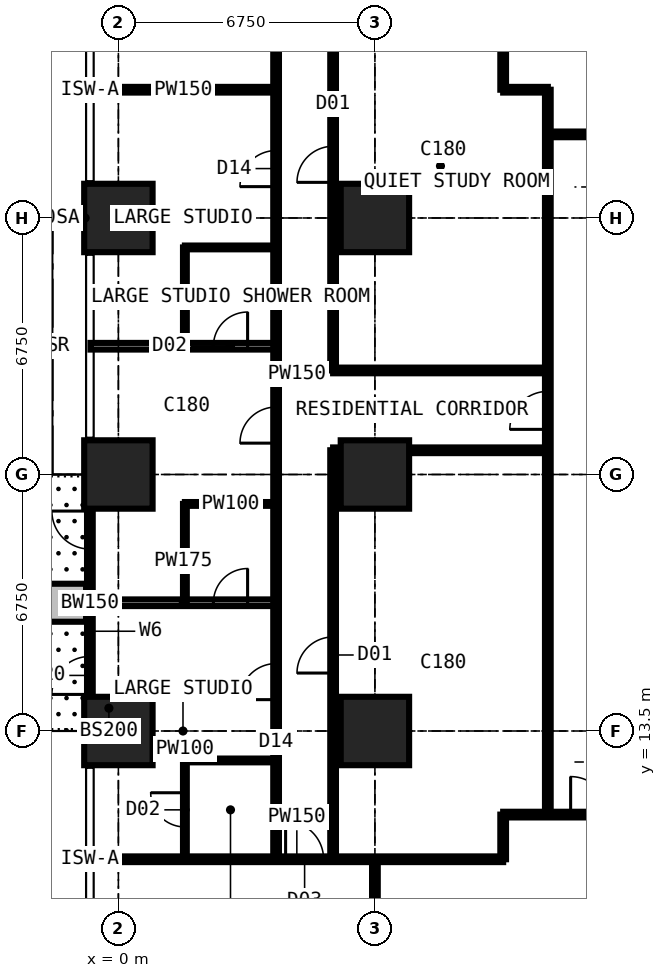
"""IFC4 building model, lengths in metres.
Left out: names, types, materials, properties, quantities, classifications, styles, units other than length and angle.
Written with IfcOpenShell. Run it as: python <this file> out.ifc"""

import sys

from ifc_helpers import new_model, si_unit, direction, frame, frame_2d, origin, origin_2d, place, context, subcontext, project, spatial, rectangle, extrude, element, fill, save


model = new_model("IFC4")
c1 = context("Model", 3, precision=1e-05, world=origin(), true_north=direction((0.0, 1.0)))
c2 = subcontext(c1, "Body", "Model", "MODEL_VIEW")
j1 = project(units=[si_unit("LENGTHUNIT", "METRE"), si_unit("PLANEANGLEUNIT", "RADIAN")], contexts=[c1])
p1 = place(None, origin())
s1 = spatial("IfcSite", under=j1, at=p1, CompositionType="ELEMENT")
p2 = place(p1, origin())
s2 = spatial("IfcBuilding", under=s1, at=p2, CompositionType="ELEMENT")
p3 = place(p2, frame((0.0, 0.0, 54.0)))
s3 = spatial("IfcBuildingStorey", under=s2, at=p3, CompositionType="ELEMENT", Elevation=54.0)
for number, where, z_axis, x_axis in (
    (1, (0.0, 13.5, 0.0), (0.0, 0.0, 1.0), (1.0, 0.0, 0.0)),
    (2, (0.0, 20.25, 0.0), (0.0, 0.0, 1.0), (1.0, 0.0, 0.0)),
    (3, (0.0, 27.0, 0.0), (0.0, 0.0, 1.0), (1.0, 0.0, 0.0)),
    (4, (6.75, 13.5, 0.0), (0.0, 0.0, 1.0), (1.0, 0.0, 0.0)),
    (5, (6.75, 20.25, 0.0), (0.0, 0.0, 1.0), (1.0, 0.0, 0.0)),
    (6, (6.75, 27.0, 0.0), (0.0, 0.0, 1.0), (1.0, 0.0, 0.0)),
):
    element("IfcColumn", number, at=place(p3, frame(where, z_axis=z_axis, x_axis=x_axis)), inside=s3, PredefinedType="COLUMN", context=c2, shape_type="SweptSolid", body=[
        extrude(rectangle(XDim=1.8, YDim=1.8, at=origin_2d()), origin(), (0.0, 0.0, 1.0), 3.6),
    ])
p4 = place(p3, frame((-0.75, 13.5, 0.0), z_axis=(0.0, 0.0, 1.0), x_axis=(0.0, 1.0, 0.0)))
e7 = element("IfcWall", 7, at=p4, inside=s3, PredefinedType="SOLIDWALL", context=c2, shape_type="SweptSolid", body=[
    extrude(rectangle(XDim=6.75, YDim=0.15, at=frame_2d((3.375, 0.0))), origin(), (0.0, 0.0, 1.0), 3.375),
])
p5 = place(p4, frame((0.962, 0.0, 0.0)))
e8 = element("IfcOpeningElement", 8, at=p5, cuts=e7, PredefinedType="OPENING", context=c2, shape_type="SweptSolid", body=[
    extrude(rectangle(XDim=1.0, YDim=2.2, at=frame_2d((0.5, 1.1))), frame((0.0, 0.085, 0.0), z_axis=(0.0, -1.0, 0.0), x_axis=(1.0, 0.0, 0.0)), (0.0, 0.0, 1.0), 0.17),
])
p6 = place(p4, frame((2.025, 0.0, 0.9)))
e9 = element("IfcOpeningElement", 9, at=p6, cuts=e7, PredefinedType="OPENING", context=c2, shape_type="SweptSolid", body=[
    extrude(rectangle(XDim=1.2, YDim=1.8, at=frame_2d((0.6, 0.9))), frame((0.0, 0.085, 0.0), z_axis=(0.0, -1.0, 0.0), x_axis=(1.0, 0.0, 0.0)), (0.0, 0.0, 1.0), 0.17),
])
p7 = place(p4, frame((4.788, 0.0, 0.0)))
e10 = element("IfcOpeningElement", 10, at=p7, cuts=e7, PredefinedType="OPENING", context=c2, shape_type="SweptSolid", body=[
    extrude(rectangle(XDim=1.0, YDim=2.2, at=frame_2d((0.5, 1.1))), frame((0.0, 0.085, 0.0), z_axis=(0.0, -1.0, 0.0), x_axis=(1.0, 0.0, 0.0)), (0.0, 0.0, 1.0), 0.17),
])
p8 = place(p4, frame((3.525, 0.0, 0.9)))
e11 = element("IfcOpeningElement", 11, at=p8, cuts=e7, PredefinedType="OPENING", context=c2, shape_type="SweptSolid", body=[
    extrude(rectangle(XDim=1.2, YDim=1.8, at=frame_2d((0.6, 0.9))), frame((0.0, 0.085, 0.0), z_axis=(0.0, -1.0, 0.0), x_axis=(1.0, 0.0, 0.0)), (0.0, 0.0, 1.0), 0.17),
])
p9 = place(p3, frame((-0.85, 16.875, 0.0), z_axis=(0.0, 0.0, 1.0), x_axis=(-1.0, 0.0, 0.0)))
e12 = element("IfcWall", 12, at=p9, inside=s3, PredefinedType="USERDEFINED", context=c2, shape_type="SweptSolid", body=[
    extrude(rectangle(XDim=2.2, YDim=1.0, at=frame_2d((1.1, 0.0))), origin(), (0.0, 0.0, 1.0), 0.9),
])
p10 = place(p3, frame((-0.734, 10.125, 0.0), z_axis=(0.0, 0.0, 1.0), x_axis=(1.0, 0.0, 0.0)))
e13 = element("IfcWall", 13, at=p10, inside=s3, PredefinedType="PARTITIONING", context=c2, shape_type="SweptSolid", body=[
    extrude(rectangle(XDim=10.859, YDim=0.15, at=frame_2d((5.429, 0.0))), origin(), (0.0, 0.0, 1.0), 3.375),
])
p11 = place(p10, frame((5.134, 0.0, 0.0)))
e14 = element("IfcOpeningElement", 14, at=p11, cuts=e13, PredefinedType="OPENING", context=c2, shape_type="SweptSolid", body=[
    extrude(rectangle(XDim=1.0, YDim=2.2, at=frame_2d((0.5, 1.1))), frame((0.0, 0.085, 0.0), z_axis=(0.0, -1.0, 0.0), x_axis=(1.0, 0.0, 0.0)), (0.0, 0.0, 1.0), 0.17),
])
p12 = place(p3, frame((-0.734, 16.875, 0.0), z_axis=(0.0, 0.0, 1.0), x_axis=(1.0, 0.0, 0.0)))
e15 = element("IfcWall", 15, at=p12, inside=s3, PredefinedType="PARTITIONING", context=c2, shape_type="SweptSolid", body=[
    extrude(rectangle(XDim=4.884, YDim=0.175, at=frame_2d((2.442, 0.0))), origin(), (0.0, 0.0, 1.0), 3.375),
])
p13 = place(p12, frame((3.234, 0.0, 0.0)))
e16 = element("IfcOpeningElement", 16, at=p13, cuts=e15, PredefinedType="OPENING", context=c2, shape_type="SweptSolid", body=[
    extrude(rectangle(XDim=0.9, YDim=2.2, at=frame_2d((0.45, 1.1))), frame((0.0, 0.097, 0.0), z_axis=(0.0, -1.0, 0.0), x_axis=(1.0, 0.0, 0.0)), (0.0, 0.0, 1.0), 0.195),
])
p14 = place(p3, frame((-0.734, 23.625, 0.0), z_axis=(0.0, 0.0, 1.0), x_axis=(1.0, 0.0, 0.0)))
e17 = element("IfcWall", 17, at=p14, inside=s3, PredefinedType="PARTITIONING", context=c2, shape_type="SweptSolid", body=[
    extrude(rectangle(XDim=4.884, YDim=0.175, at=frame_2d((2.442, 0.0))), origin(), (0.0, 0.0, 1.0), 3.375),
])
p15 = place(p14, frame((3.234, 0.0, 0.0)))
e18 = element("IfcOpeningElement", 18, at=p15, cuts=e17, PredefinedType="OPENING", context=c2, shape_type="SweptSolid", body=[
    extrude(rectangle(XDim=0.9, YDim=2.2, at=frame_2d((0.45, 1.1))), frame((0.0, 0.097, 0.0), z_axis=(0.0, -1.0, 0.0), x_axis=(1.0, 0.0, 0.0)), (0.0, 0.0, 1.0), 0.195),
])
p16 = place(p3, frame((-0.734, 30.375, 0.0), z_axis=(0.0, 0.0, 1.0), x_axis=(1.0, 0.0, 0.0)))
e19 = element("IfcWall", 19, at=p16, inside=s3, PredefinedType="PARTITIONING", context=c2, shape_type="SweptSolid", body=[
    extrude(rectangle(XDim=4.884, YDim=0.15, at=frame_2d((2.442, 0.0))), origin(), (0.0, 0.0, 1.0), 3.375),
])
p17 = place(p3, frame((1.75, 10.125, 0.0), z_axis=(0.0, 0.0, 1.0), x_axis=(0.0, 1.0, 0.0)))
e20 = element("IfcWall", 20, at=p17, inside=s3, PredefinedType="PARTITIONING", context=c2, shape_type="SweptSolid", body=[
    extrude(rectangle(XDim=2.6, YDim=0.1, at=frame_2d((1.3, 0.0))), origin(), (0.0, 0.0, 1.0), 3.375),
])
p18 = place(p17, frame((0.85, 0.0, 0.0)))
e21 = element("IfcOpeningElement", 21, at=p18, cuts=e20, PredefinedType="OPENING", context=c2, shape_type="SweptSolid", body=[
    extrude(rectangle(XDim=0.9, YDim=2.2, at=frame_2d((0.45, 1.1))), frame((0.0, 0.06, 0.0), z_axis=(0.0, -1.0, 0.0), x_axis=(1.0, 0.0, 0.0)), (0.0, 0.0, 1.0), 0.12),
])
p19 = place(p3, frame((1.75, 12.725, 0.0), z_axis=(0.0, 0.0, 1.0), x_axis=(1.0, 0.0, 0.0)))
e22 = element("IfcWall", 22, at=p19, inside=s3, PredefinedType="PARTITIONING", context=c2, shape_type="SweptSolid", body=[
    extrude(rectangle(XDim=2.4, YDim=0.1, at=frame_2d((1.2, 0.0))), origin(), (0.0, 0.0, 1.0), 3.375),
])
p20 = place(p3, frame((1.75, 16.875, 0.0), z_axis=(0.0, 0.0, 1.0), x_axis=(0.0, 1.0, 0.0)))
e23 = element("IfcWall", 23, at=p20, inside=s3, PredefinedType="PARTITIONING", context=c2, shape_type="SweptSolid", body=[
    extrude(rectangle(XDim=2.6, YDim=0.1, at=frame_2d((1.3, 0.0))), origin(), (0.0, 0.0, 1.0), 3.375),
])
p21 = place(p3, frame((1.75, 19.475, 0.0), z_axis=(0.0, 0.0, 1.0), x_axis=(1.0, 0.0, 0.0)))
e24 = element("IfcWall", 24, at=p21, inside=s3, PredefinedType="PARTITIONING", context=c2, shape_type="SweptSolid", body=[
    extrude(rectangle(XDim=2.4, YDim=0.1, at=frame_2d((1.2, 0.0))), origin(), (0.0, 0.0, 1.0), 3.375),
])
p22 = place(p3, frame((1.75, 23.625, 0.0), z_axis=(0.0, 0.0, 1.0), x_axis=(0.0, 1.0, 0.0)))
e25 = element("IfcWall", 25, at=p22, inside=s3, PredefinedType="PARTITIONING", context=c2, shape_type="SweptSolid", body=[
    extrude(rectangle(XDim=2.6, YDim=0.1, at=frame_2d((1.3, 0.0))), origin(), (0.0, 0.0, 1.0), 3.375),
])
p23 = place(p3, frame((1.75, 26.225, 0.0), z_axis=(0.0, 0.0, 1.0), x_axis=(1.0, 0.0, 0.0)))
e26 = element("IfcWall", 26, at=p23, inside=s3, PredefinedType="PARTITIONING", context=c2, shape_type="SweptSolid", body=[
    extrude(rectangle(XDim=2.4, YDim=0.1, at=frame_2d((1.2, 0.0))), origin(), (0.0, 0.0, 1.0), 3.375),
])
p24 = place(p3, frame((4.15, 10.125, 0.0), z_axis=(0.0, 0.0, 1.0), x_axis=(0.0, 1.0, 0.0)))
e27 = element("IfcWall", 27, at=p24, inside=s3, PredefinedType="PARTITIONING", context=c2, shape_type="SweptSolid", body=[
    extrude(rectangle(XDim=23.625, YDim=0.15, at=frame_2d((11.812, 0.0))), origin(), (0.0, 0.0, 1.0), 3.375),
])
p25 = place(p24, frame((4.2, 0.0, 0.0)))
e28 = element("IfcOpeningElement", 28, at=p25, cuts=e27, PredefinedType="OPENING", context=c2, shape_type="SweptSolid", body=[
    extrude(rectangle(XDim=0.95, YDim=2.2, at=frame_2d((0.475, 1.1))), frame((0.0, 0.085, 0.0), z_axis=(0.0, -1.0, 0.0), x_axis=(1.0, 0.0, 0.0)), (0.0, 0.0, 1.0), 0.17),
])
p26 = place(p24, frame((10.95, 0.0, 0.0)))
e29 = element("IfcOpeningElement", 29, at=p26, cuts=e27, PredefinedType="OPENING", context=c2, shape_type="SweptSolid", body=[
    extrude(rectangle(XDim=0.95, YDim=2.2, at=frame_2d((0.475, 1.1))), frame((0.0, 0.085, 0.0), z_axis=(0.0, -1.0, 0.0), x_axis=(1.0, 0.0, 0.0)), (0.0, 0.0, 1.0), 0.17),
])
p27 = place(p24, frame((17.7, 0.0, 0.0)))
e30 = element("IfcOpeningElement", 30, at=p27, cuts=e27, PredefinedType="OPENING", context=c2, shape_type="SweptSolid", body=[
    extrude(rectangle(XDim=0.95, YDim=2.2, at=frame_2d((0.475, 1.1))), frame((0.0, 0.085, 0.0), z_axis=(0.0, -1.0, 0.0), x_axis=(1.0, 0.0, 0.0)), (0.0, 0.0, 1.0), 0.17),
])
p28 = place(p3, frame((5.65, 10.125, 0.0), z_axis=(0.0, 0.0, 1.0), x_axis=(0.0, 1.0, 0.0)))
e31 = element("IfcWall", 31, at=p28, inside=s3, PredefinedType="PARTITIONING", context=c2, shape_type="SweptSolid", body=[
    extrude(rectangle(XDim=10.762, YDim=0.15, at=frame_2d((5.381, 0.0))), origin(), (0.0, 0.0, 1.0), 3.375),
])
p29 = place(p28, frame((4.9, 0.0, 0.0)))
e32 = element("IfcOpeningElement", 32, at=p29, cuts=e31, PredefinedType="OPENING", context=c2, shape_type="SweptSolid", body=[
    extrude(rectangle(XDim=0.95, YDim=2.2, at=frame_2d((0.475, 1.1))), frame((0.0, 0.085, 0.0), z_axis=(0.0, -1.0, 0.0), x_axis=(1.0, 0.0, 0.0)), (0.0, 0.0, 1.0), 0.17),
])
p30 = place(p3, frame((5.65, 20.887, 0.0), z_axis=(0.0, 0.0, 1.0), x_axis=(1.0, 0.0, 0.0)))
e33 = element("IfcWall", 33, at=p30, inside=s3, PredefinedType="PARTITIONING", context=c2, shape_type="SweptSolid", body=[
    extrude(rectangle(XDim=5.65, YDim=0.15, at=frame_2d((2.825, 0.0))), origin(), (0.0, 0.0, 1.0), 3.375),
])
p31 = place(p3, frame((5.65, 22.988, 0.0), z_axis=(0.0, 0.0, 1.0), x_axis=(0.0, 1.0, 0.0)))
e34 = element("IfcWall", 34, at=p31, inside=s3, PredefinedType="PARTITIONING", context=c2, shape_type="SweptSolid", body=[
    extrude(rectangle(XDim=10.762, YDim=0.15, at=frame_2d((5.381, 0.0))), origin(), (0.0, 0.0, 1.0), 3.375),
])
p32 = place(p31, frame((4.95, 0.0, 0.0)))
e35 = element("IfcOpeningElement", 35, at=p32, cuts=e34, PredefinedType="OPENING", context=c2, shape_type="SweptSolid", body=[
    extrude(rectangle(XDim=0.95, YDim=2.2, at=frame_2d((0.475, 1.1))), frame((0.0, 0.085, 0.0), z_axis=(0.0, -1.0, 0.0), x_axis=(1.0, 0.0, 0.0)), (0.0, 0.0, 1.0), 0.17),
])
p33 = place(p3, frame((5.65, 22.988, 0.0), z_axis=(0.0, 0.0, 1.0), x_axis=(1.0, 0.0, 0.0)))
e36 = element("IfcWall", 36, at=p33, inside=s3, PredefinedType="PARTITIONING", context=c2, shape_type="SweptSolid", body=[
    extrude(rectangle(XDim=5.65, YDim=0.15, at=frame_2d((2.825, 0.0))), origin(), (0.0, 0.0, 1.0), 3.375),
])
p34 = place(p3, frame((6.75, -0.734, 0.0), z_axis=(0.0, 0.0, 1.0), x_axis=(0.0, 1.0, 0.0)))
e37 = element("IfcWall", 37, at=p34, inside=s3, PredefinedType="PARTITIONING", context=c2, shape_type="SweptSolid", body=[
    extrude(rectangle(XDim=10.859, YDim=0.15, at=frame_2d((5.429, 0.0))), origin(), (0.0, 0.0, 1.0), 2.877),
])
p35 = place(p3, frame((10.125, 10.125, 0.0), z_axis=(0.0, 0.0, 1.0), x_axis=(0.0, 1.0, 0.0)))
e38 = element("IfcWall", 38, at=p35, inside=s3, PredefinedType="PARTITIONING", context=c2, shape_type="SweptSolid", body=[
    extrude(rectangle(XDim=1.175, YDim=0.15, at=frame_2d((0.587, 0.0))), origin(), (0.0, 0.0, 1.0), 3.375),
])
p36 = place(p3, frame((10.125, 11.3, 0.0), z_axis=(0.0, 0.0, 1.0), x_axis=(1.0, 0.0, 0.0)))
e39 = element("IfcWall", 39, at=p36, inside=s3, PredefinedType="PARTITIONING", context=c2, shape_type="SweptSolid", body=[
    extrude(rectangle(XDim=20.675, YDim=0.15, at=frame_2d((10.337, 0.0))), origin(), (0.0, 0.0, 1.0), 3.375),
])
p37 = place(p36, frame((1.775, 0.0, 0.0)))
e40 = element("IfcOpeningElement", 40, at=p37, cuts=e39, PredefinedType="OPENING", context=c2, shape_type="SweptSolid", body=[
    extrude(rectangle(XDim=1.0, YDim=2.2, at=frame_2d((0.5, 1.1))), frame((0.0, 0.085, 0.0), z_axis=(0.0, -1.0, 0.0), x_axis=(1.0, 0.0, 0.0)), (0.0, 0.0, 1.0), 0.17),
])
p38 = place(p36, frame((11.312, 0.0, 0.0)))
e41 = element("IfcOpeningElement", 41, at=p38, cuts=e39, PredefinedType="OPENING", context=c2, shape_type="SweptSolid", body=[
    extrude(rectangle(XDim=1.0, YDim=2.2, at=frame_2d((0.5, 1.1))), frame((0.0, 0.085, 0.0), z_axis=(0.0, -1.0, 0.0), x_axis=(1.0, 0.0, 0.0)), (0.0, 0.0, 1.0), 0.17),
])
p39 = place(p3, frame((10.125, 30.375, 0.0), z_axis=(0.0, 0.0, 1.0), x_axis=(0.0, 1.0, 0.0)))
e42 = element("IfcWall", 42, at=p39, inside=s3, PredefinedType="PARTITIONING", context=c2, shape_type="SweptSolid", body=[
    extrude(rectangle(XDim=10.859, YDim=0.15, at=frame_2d((5.429, 0.0))), origin(), (0.0, 0.0, 1.0), 3.375),
])
p40 = place(p39, frame((4.725, 0.0, 0.0)))
e43 = element("IfcOpeningElement", 43, at=p40, cuts=e42, PredefinedType="OPENING", context=c2, shape_type="SweptSolid", body=[
    extrude(rectangle(XDim=1.0, YDim=2.2, at=frame_2d((0.5, 1.1))), frame((0.0, 0.085, 0.0), z_axis=(0.0, -1.0, 0.0), x_axis=(1.0, 0.0, 0.0)), (0.0, 0.0, 1.0), 0.17),
])
p41 = place(p3, frame((10.125, 30.375, 0.0), z_axis=(0.0, 0.0, 1.0), x_axis=(1.0, 0.0, 0.0)))
e44 = element("IfcWall", 44, at=p41, inside=s3, PredefinedType="PARTITIONING", context=c2, shape_type="SweptSolid", body=[
    extrude(rectangle(XDim=1.175, YDim=0.15, at=frame_2d((0.587, 0.0))), origin(), (0.0, 0.0, 1.0), 3.375),
])
p42 = place(p3, frame((11.3, 11.3, 0.0), z_axis=(0.0, 0.0, 1.0), x_axis=(0.0, 1.0, 0.0)))
e45 = element("IfcWall", 45, at=p42, inside=s3, PredefinedType="PARTITIONING", context=c2, shape_type="SweptSolid", body=[
    extrude(rectangle(XDim=19.075, YDim=0.15, at=frame_2d((9.538, 0.0))), origin(), (0.0, 0.0, 1.0), 3.375),
])
p43 = place(p42, frame((10.137, 0.0, 0.0)))
e46 = element("IfcOpeningElement", 46, at=p43, cuts=e45, PredefinedType="OPENING", context=c2, shape_type="SweptSolid", body=[
    extrude(rectangle(XDim=1.0, YDim=2.2, at=frame_2d((0.5, 1.1))), frame((0.0, 0.085, 0.0), z_axis=(0.0, -1.0, 0.0), x_axis=(1.0, 0.0, 0.0)), (0.0, 0.0, 1.0), 0.17),
])
p44 = place(p3, frame((11.3, 29.2, 0.0), z_axis=(0.0, 0.0, 1.0), x_axis=(1.0, 0.0, 0.0)))
e47 = element("IfcWall", 47, at=p44, inside=s3, PredefinedType="PARTITIONING", context=c2, shape_type="SweptSolid", body=[
    extrude(rectangle(XDim=19.075, YDim=0.15, at=frame_2d((9.538, 0.0))), origin(), (0.0, 0.0, 1.0), 3.375),
])
p45 = place(p44, frame((12.875, 0.0, 0.0)))
e48 = element("IfcOpeningElement", 48, at=p45, cuts=e47, PredefinedType="OPENING", context=c2, shape_type="SweptSolid", body=[
    extrude(rectangle(XDim=1.0, YDim=2.2, at=frame_2d((0.5, 1.1))), frame((0.0, 0.085, 0.0), z_axis=(0.0, -1.0, 0.0), x_axis=(1.0, 0.0, 0.0)), (0.0, 0.0, 1.0), 0.17),
])
p46 = place(p44, frame((10.438, 0.0, 0.0)))
e49 = element("IfcOpeningElement", 49, at=p46, cuts=e47, PredefinedType="OPENING", context=c2, shape_type="SweptSolid", body=[
    extrude(rectangle(XDim=1.0, YDim=2.2, at=frame_2d((0.5, 1.1))), frame((0.0, 0.085, 0.0), z_axis=(0.0, -1.0, 0.0), x_axis=(1.0, 0.0, 0.0)), (0.0, 0.0, 1.0), 0.17),
])
p47 = place(p44, frame((14.875, 0.0, 0.0)))
e50 = element("IfcOpeningElement", 50, at=p47, cuts=e47, PredefinedType="OPENING", context=c2, shape_type="SweptSolid", body=[
    extrude(rectangle(XDim=0.95, YDim=2.2, at=frame_2d((0.475, 1.1))), frame((0.0, 0.085, 0.0), z_axis=(0.0, -1.0, 0.0), x_axis=(1.0, 0.0, 0.0)), (0.0, 0.0, 1.0), 0.17),
])
p48 = place(p5, origin())
e51 = element("IfcDoor", 51, at=p48, inside=s3, OperationType="SINGLE_SWING_LEFT", PredefinedType="DOOR", context=c2, shape_type="SweptSolid", body=[
    extrude(rectangle(XDim=1.0, YDim=2.2, at=frame_2d((0.5, 1.1))), frame((0.0, 0.025, 0.0), z_axis=(0.0, -1.0, 0.0), x_axis=(1.0, 0.0, 0.0)), (0.0, 0.0, 1.0), 0.05),
])
fill(e8, e51)
p49 = place(p6, origin())
e52 = element("IfcWindow", 52, at=p49, inside=s3, PartitioningType="SINGLE_PANEL", PredefinedType="WINDOW", context=c2, shape_type="SweptSolid", body=[
    extrude(rectangle(XDim=1.2, YDim=1.8, at=frame_2d((0.6, 0.9))), frame((0.0, 0.03, 0.0), z_axis=(0.0, -1.0, 0.0), x_axis=(1.0, 0.0, 0.0)), (0.0, 0.0, 1.0), 0.06),
])
fill(e9, e52)
p50 = place(p7, origin())
e53 = element("IfcDoor", 53, at=p50, inside=s3, OperationType="SINGLE_SWING_RIGHT", PredefinedType="DOOR", context=c2, shape_type="SweptSolid", body=[
    extrude(rectangle(XDim=1.0, YDim=2.2, at=frame_2d((0.5, 1.1))), frame((0.0, 0.025, 0.0), z_axis=(0.0, -1.0, 0.0), x_axis=(1.0, 0.0, 0.0)), (0.0, 0.0, 1.0), 0.05),
])
fill(e10, e53)
p51 = place(p8, origin())
e54 = element("IfcWindow", 54, at=p51, inside=s3, PartitioningType="SINGLE_PANEL", PredefinedType="WINDOW", context=c2, shape_type="SweptSolid", body=[
    extrude(rectangle(XDim=1.2, YDim=1.8, at=frame_2d((0.6, 0.9))), frame((0.0, 0.03, 0.0), z_axis=(0.0, -1.0, 0.0), x_axis=(1.0, 0.0, 0.0)), (0.0, 0.0, 1.0), 0.06),
])
fill(e11, e54)
p52 = place(p11, origin())
e55 = element("IfcDoor", 55, at=p52, inside=s3, OperationType="SINGLE_SWING_LEFT", PredefinedType="DOOR", context=c2, shape_type="SweptSolid", body=[
    extrude(rectangle(XDim=1.0, YDim=2.2, at=frame_2d((0.5, 1.1))), frame((0.0, 0.025, 0.0), z_axis=(0.0, -1.0, 0.0), x_axis=(1.0, 0.0, 0.0)), (0.0, 0.0, 1.0), 0.05),
])
fill(e14, e55)
p53 = place(p37, origin())
e56 = element("IfcDoor", 56, at=p53, inside=s3, OperationType="SINGLE_SWING_LEFT", PredefinedType="DOOR", context=c2, shape_type="SweptSolid", body=[
    extrude(rectangle(XDim=1.0, YDim=2.2, at=frame_2d((0.5, 1.1))), frame((0.0, 0.025, 0.0), z_axis=(0.0, -1.0, 0.0), x_axis=(1.0, 0.0, 0.0)), (0.0, 0.0, 1.0), 0.05),
])
fill(e40, e56)
p54 = place(p25, origin())
e57 = element("IfcDoor", 57, at=p54, inside=s3, OperationType="SINGLE_SWING_LEFT", PredefinedType="DOOR", context=c2, shape_type="SweptSolid", body=[
    extrude(rectangle(XDim=0.95, YDim=2.2, at=frame_2d((0.475, 1.1))), frame((0.0, 0.025, 0.0), z_axis=(0.0, -1.0, 0.0), x_axis=(1.0, 0.0, 0.0)), (0.0, 0.0, 1.0), 0.05),
])
fill(e28, e57)
p55 = place(p18, origin())
e58 = element("IfcDoor", 58, at=p55, inside=s3, OperationType="SINGLE_SWING_RIGHT", PredefinedType="DOOR", context=c2, shape_type="SweptSolid", body=[
    extrude(rectangle(XDim=0.9, YDim=2.2, at=frame_2d((0.45, 1.1))), frame((0.0, 0.025, 0.0), z_axis=(0.0, -1.0, 0.0), x_axis=(1.0, 0.0, 0.0)), (0.0, 0.0, 1.0), 0.05),
])
fill(e21, e58)
p56 = place(p26, origin())
e59 = element("IfcDoor", 59, at=p56, inside=s3, OperationType="SINGLE_SWING_LEFT", PredefinedType="DOOR", context=c2, shape_type="SweptSolid", body=[
    extrude(rectangle(XDim=0.95, YDim=2.2, at=frame_2d((0.475, 1.1))), frame((0.0, 0.025, 0.0), z_axis=(0.0, -1.0, 0.0), x_axis=(1.0, 0.0, 0.0)), (0.0, 0.0, 1.0), 0.05),
])
fill(e29, e59)
p57 = place(p13, origin())
e60 = element("IfcDoor", 60, at=p57, inside=s3, OperationType="SINGLE_SWING_RIGHT", PredefinedType="DOOR", context=c2, shape_type="SweptSolid", body=[
    extrude(rectangle(XDim=0.9, YDim=2.2, at=frame_2d((0.45, 1.1))), frame((0.0, 0.025, 0.0), z_axis=(0.0, -1.0, 0.0), x_axis=(1.0, 0.0, 0.0)), (0.0, 0.0, 1.0), 0.05),
])
fill(e16, e60)
p58 = place(p27, origin())
e61 = element("IfcDoor", 61, at=p58, inside=s3, OperationType="SINGLE_SWING_LEFT", PredefinedType="DOOR", context=c2, shape_type="SweptSolid", body=[
    extrude(rectangle(XDim=0.95, YDim=2.2, at=frame_2d((0.475, 1.1))), frame((0.0, 0.025, 0.0), z_axis=(0.0, -1.0, 0.0), x_axis=(1.0, 0.0, 0.0)), (0.0, 0.0, 1.0), 0.05),
])
fill(e30, e61)
p59 = place(p15, origin())
e62 = element("IfcDoor", 62, at=p59, inside=s3, OperationType="SINGLE_SWING_RIGHT", PredefinedType="DOOR", context=c2, shape_type="SweptSolid", body=[
    extrude(rectangle(XDim=0.9, YDim=2.2, at=frame_2d((0.45, 1.1))), frame((0.0, 0.025, 0.0), z_axis=(0.0, -1.0, 0.0), x_axis=(1.0, 0.0, 0.0)), (0.0, 0.0, 1.0), 0.05),
])
fill(e18, e62)
p60 = place(p43, origin())
e63 = element("IfcDoor", 63, at=p60, inside=s3, OperationType="SINGLE_SWING_LEFT", PredefinedType="DOOR", context=c2, shape_type="SweptSolid", body=[
    extrude(rectangle(XDim=1.0, YDim=2.2, at=frame_2d((0.5, 1.1))), frame((0.0, 0.025, 0.0), z_axis=(0.0, -1.0, 0.0), x_axis=(1.0, 0.0, 0.0)), (0.0, 0.0, 1.0), 0.05),
])
fill(e46, e63)
p61 = place(p29, origin())
e64 = element("IfcDoor", 64, at=p61, inside=s3, OperationType="SINGLE_SWING_LEFT", PredefinedType="DOOR", context=c2, shape_type="SweptSolid", body=[
    extrude(rectangle(XDim=0.95, YDim=2.2, at=frame_2d((0.475, 1.1))), frame((0.0, 0.025, 0.0), z_axis=(0.0, -1.0, 0.0), x_axis=(1.0, 0.0, 0.0)), (0.0, 0.0, 1.0), 0.05),
])
fill(e32, e64)
p62 = place(p32, origin())
e65 = element("IfcDoor", 65, at=p62, inside=s3, OperationType="SINGLE_SWING_LEFT", PredefinedType="DOOR", context=c2, shape_type="SweptSolid", body=[
    extrude(rectangle(XDim=0.95, YDim=2.2, at=frame_2d((0.475, 1.1))), frame((0.0, 0.025, 0.0), z_axis=(0.0, -1.0, 0.0), x_axis=(1.0, 0.0, 0.0)), (0.0, 0.0, 1.0), 0.05),
])
fill(e35, e65)
save(model, sys.argv[1])
